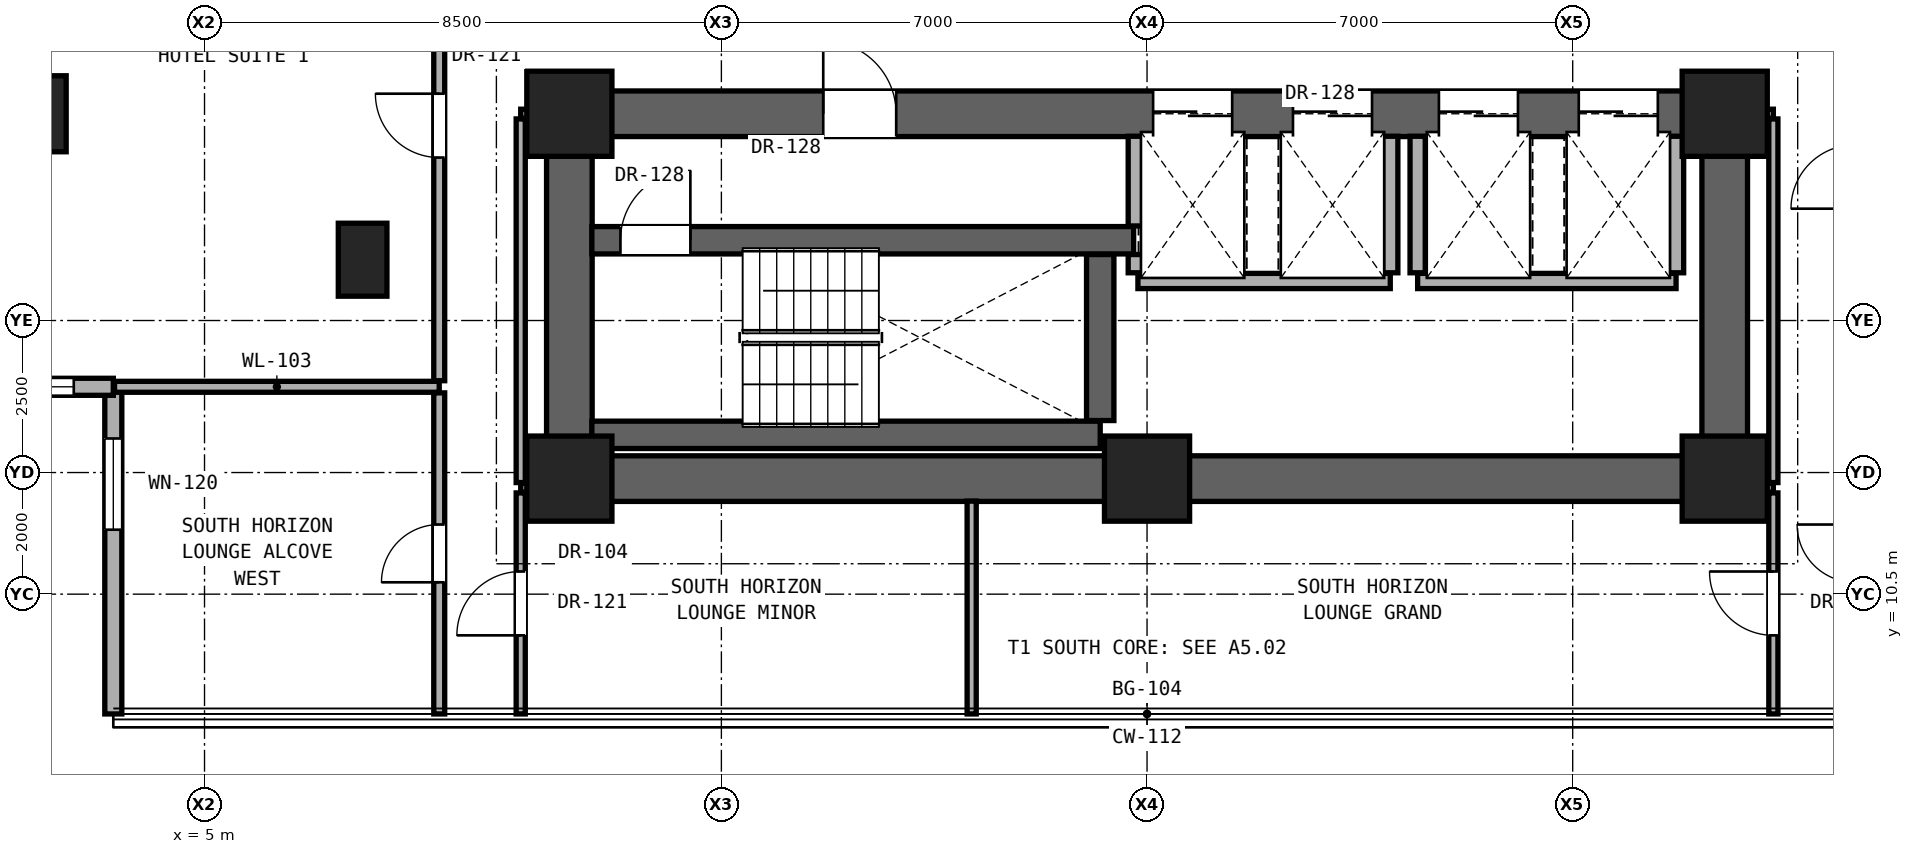
"""IFC4 building model, lengths in metres.
Left out: names, types, materials, properties, quantities, classifications, styles, units other than length and angle.
Written with IfcOpenShell. Run it as: python <this file> out.ifc"""

import sys

from ifc_helpers import new_model, si_unit, direction, frame, frame_2d, origin, origin_2d, place, context, subcontext, project, spatial, rectangle, hollow_rectangle, extrude, element, fill, save


model = new_model("IFC4")
c1 = context("Model", 3, precision=1e-05, world=origin(), true_north=direction((0.0, 1.0)))
c2 = subcontext(c1, "Body", "Model", "MODEL_VIEW")
j1 = project(units=[si_unit("LENGTHUNIT", "METRE"), si_unit("PLANEANGLEUNIT", "RADIAN")], contexts=[c1])
p1 = place(None, origin())
s1 = spatial("IfcSite", under=j1, at=p1, CompositionType="ELEMENT")
p2 = place(p1, origin())
s2 = spatial("IfcBuilding", under=s1, at=p2, CompositionType="ELEMENT")
p3 = place(p2, frame((0.0, 0.0, 38.9)))
s3 = spatial("IfcBuildingStorey", under=s2, at=p3, CompositionType="ELEMENT", Elevation=38.9)
for number, where, z_axis, x_axis in (
    (1, (11.0, 12.4, 0.0), (0.0, 0.0, 1.0), (1.0, 0.0, 0.0)),
    (2, (20.5, 12.4, 0.0), (0.0, 0.0, 1.0), (1.0, 0.0, 0.0)),
    (3, (30.0, 12.4, 0.0), (0.0, 0.0, 1.0), (1.0, 0.0, 0.0)),
    (4, (11.0, 18.4, 0.0), (0.0, 0.0, 1.0), (1.0, 0.0, 0.0)),
    (5, (30.0, 18.4, 0.0), (0.0, 0.0, 1.0), (1.0, 0.0, 0.0)),
):
    element("IfcColumn", number, at=place(p3, frame(where, z_axis=z_axis, x_axis=x_axis)), inside=s3, PredefinedType="COLUMN", context=c2, shape_type="SweptSolid", body=[
        extrude(rectangle(XDim=1.4, YDim=1.4, at=origin_2d()), origin(), (0.0, 0.0, 1.0), 3.3),
    ])
p4 = place(p3, frame((2.1, 18.4, 0.0), z_axis=(0.0, 0.0, 1.0), x_axis=(1.0, 0.0, 0.0)))
e6 = element("IfcColumn", 6, at=p4, inside=s3, PredefinedType="COLUMN", context=c2, shape_type="SweptSolid", body=[
    extrude(hollow_rectangle(XDim=1.25, YDim=1.25, WallThickness=0.07, at=origin_2d()), origin(), (0.0, 0.0, 1.0), 3.3),
])
p5 = place(p3, frame((7.6, 16.0, 0.0), z_axis=(0.0, 0.0, 1.0), x_axis=(1.0, 0.0, 0.0)))
e7 = element("IfcColumn", 7, at=p5, inside=s3, PredefinedType="PILASTER", context=c2, shape_type="SweptSolid", body=[
    extrude(rectangle(XDim=0.8, YDim=1.2, at=origin_2d()), origin(), (0.0, 0.0, 1.0), 3.3),
])
p6 = place(p3, frame((11.0, 12.4, 0.0), z_axis=(0.0, 0.0, 1.0), x_axis=(1.0, 0.0, 0.0)))
e8 = element("IfcWall", 8, at=p6, inside=s3, PredefinedType="SHEAR", context=c2, shape_type="SweptSolid", body=[
    extrude(rectangle(XDim=19.0, YDim=0.75, at=frame_2d((9.5, 0.0))), origin(), (0.0, 0.0, 1.0), 3.06),
])
for number, where, z_axis, x_axis in (
    (9, (11.0, 12.4, 0.0), (0.0, 0.0, 1.0), (0.0, 1.0, 0.0)),
    (10, (30.0, 12.4, 0.0), (0.0, 0.0, 1.0), (0.0, 1.0, 0.0)),
):
    element("IfcWall", number, at=place(p3, frame(where, z_axis=z_axis, x_axis=x_axis)), inside=s3, PredefinedType="SHEAR", context=c2, shape_type="SweptSolid", body=[
        extrude(rectangle(XDim=6.0, YDim=0.75, at=frame_2d((3.0, 0.0))), origin(), (0.0, 0.0, 1.0), 3.06),
    ])
p7 = place(p3, frame((11.0, 18.4, 0.0), z_axis=(0.0, 0.0, 1.0), x_axis=(1.0, 0.0, 0.0)))
e11 = element("IfcWall", 11, at=p7, inside=s3, PredefinedType="SHEAR", context=c2, shape_type="SweptSolid", body=[
    extrude(rectangle(XDim=19.0, YDim=0.75, at=frame_2d((9.5, 0.0))), origin(), (0.0, 0.0, 1.0), 3.06),
])
p8 = place(p7, frame((4.175, 0.0, 0.0)))
e12 = element("IfcOpeningElement", 12, at=p8, cuts=e11, PredefinedType="OPENING", context=c2, shape_type="SweptSolid", body=[
    extrude(rectangle(XDim=1.2, YDim=2.25, at=frame_2d((0.6, 1.125))), frame((0.0, 0.385, 0.0), z_axis=(0.0, -1.0, 0.0), x_axis=(1.0, 0.0, 0.0)), (0.0, 0.0, 1.0), 0.77),
])
p9 = place(p7, frame((9.6, 0.0, 0.0)))
e13 = element("IfcOpeningElement", 13, at=p9, cuts=e11, PredefinedType="OPENING", context=c2, shape_type="SweptSolid", body=[
    extrude(rectangle(XDim=1.3, YDim=2.3, at=frame_2d((0.65, 1.15))), frame((0.0, 0.385, 0.0), z_axis=(0.0, -1.0, 0.0), x_axis=(1.0, 0.0, 0.0)), (0.0, 0.0, 1.0), 0.77),
])
p10 = place(p7, frame((11.9, 0.0, 0.0)))
e14 = element("IfcOpeningElement", 14, at=p10, cuts=e11, PredefinedType="OPENING", context=c2, shape_type="SweptSolid", body=[
    extrude(rectangle(XDim=1.3, YDim=2.3, at=frame_2d((0.65, 1.15))), frame((0.0, 0.385, 0.0), z_axis=(0.0, -1.0, 0.0), x_axis=(1.0, 0.0, 0.0)), (0.0, 0.0, 1.0), 0.77),
])
p11 = place(p7, frame((14.3, 0.0, 0.0)))
e15 = element("IfcOpeningElement", 15, at=p11, cuts=e11, PredefinedType="OPENING", context=c2, shape_type="SweptSolid", body=[
    extrude(rectangle(XDim=1.3, YDim=2.3, at=frame_2d((0.65, 1.15))), frame((0.0, 0.385, 0.0), z_axis=(0.0, -1.0, 0.0), x_axis=(1.0, 0.0, 0.0)), (0.0, 0.0, 1.0), 0.77),
])
p12 = place(p7, frame((16.6, 0.0, 0.0)))
e16 = element("IfcOpeningElement", 16, at=p12, cuts=e11, PredefinedType="OPENING", context=c2, shape_type="SweptSolid", body=[
    extrude(rectangle(XDim=1.3, YDim=2.3, at=frame_2d((0.65, 1.15))), frame((0.0, 0.385, 0.0), z_axis=(0.0, -1.0, 0.0), x_axis=(1.0, 0.0, 0.0)), (0.0, 0.0, 1.0), 0.77),
])
p13 = place(p3, frame((3.5, 13.91, 0.0), z_axis=(0.0, 0.0, 1.0), x_axis=(0.0, -1.0, 0.0)))
e17 = element("IfcWall", 17, at=p13, inside=s3, PredefinedType="SOLIDWALL", context=c2, shape_type="SweptSolid", body=[
    extrude(rectangle(XDim=5.38, YDim=0.28, at=frame_2d((2.69, 0.0))), origin(), (0.0, 0.0, 1.0), 3.04),
])
p14 = place(p13, frame((0.85, 0.0, 0.79)))
e18 = element("IfcOpeningElement", 18, at=p14, cuts=e17, PredefinedType="OPENING", context=c2, shape_type="SweptSolid", body=[
    extrude(rectangle(XDim=1.5, YDim=2.1, at=frame_2d((0.75, 1.05))), frame((0.0, 0.15, 0.0), z_axis=(0.0, -1.0, 0.0), x_axis=(1.0, 0.0, 0.0)), (0.0, 0.0, 1.0), 0.3),
])
p15 = place(p3, frame((-1.88, 13.91, 0.0), z_axis=(0.0, 0.0, 1.0), x_axis=(1.0, 0.0, 0.0)))
e19 = element("IfcWall", 19, at=p15, inside=s3, PredefinedType="SOLIDWALL", context=c2, shape_type="SweptSolid", body=[
    extrude(rectangle(XDim=5.38, YDim=0.28, at=frame_2d((2.69, 0.0))), origin(), (0.0, 0.0, 1.0), 3.04),
])
p16 = place(p15, frame((3.63, 0.0, 0.85)))
e20 = element("IfcOpeningElement", 20, at=p16, cuts=e19, PredefinedType="OPENING", context=c2, shape_type="SweptSolid", body=[
    extrude(rectangle(XDim=1.1, YDim=2.0, at=frame_2d((0.55, 1.0))), frame((0.0, 0.15, 0.0), z_axis=(0.0, -1.0, 0.0), x_axis=(1.0, 0.0, 0.0)), (0.0, 0.0, 1.0), 0.3),
])
for number, where, z_axis, x_axis in (
    (21, (10.2, 12.25, 0.0), (0.0, 0.0, 1.0), (1.0, 0.0, 0.0)),
    (22, (30.37, 12.25, 0.0), (0.0, 0.0, 1.0), (1.0, 0.0, 0.0)),
):
    element("IfcWall", number, at=place(p3, frame(where, z_axis=z_axis, x_axis=x_axis)), inside=s3, PredefinedType="PARTITIONING", context=c2, shape_type="SweptSolid", body=[
        extrude(rectangle(XDim=0.43, YDim=0.15, at=frame_2d((0.215, 0.0))), origin(), (0.0, 0.0, 1.0), 3.06),
    ])
p17 = place(p3, frame((11.37, 13.12, 0.0), z_axis=(0.0, 0.0, 1.0), x_axis=(1.0, 0.0, 0.0)))
e23 = element("IfcWall", 23, at=p17, inside=s3, PredefinedType="SHEAR", context=c2, shape_type="SweptSolid", body=[
    extrude(rectangle(XDim=8.36, YDim=0.45, at=frame_2d((4.18, 0.0))), origin(), (0.0, 0.0, 1.0), 3.06),
])
p18 = place(p3, frame((3.52, 13.91, 0.0), z_axis=(0.0, 0.0, 1.0), x_axis=(1.0, 0.0, 0.0)))
e24 = element("IfcWall", 24, at=p18, inside=s3, PredefinedType="PARTITIONING", context=c2, shape_type="SweptSolid", body=[
    extrude(rectangle(XDim=5.34, YDim=0.18, at=frame_2d((2.67, 0.0))), origin(), (0.0, 0.0, 1.0), 3.06),
])
p19 = place(p3, frame((20.35, 15.65, 0.0), z_axis=(0.0, 0.0, 1.0), x_axis=(1.0, 0.0, 0.0)))
e25 = element("IfcWall", 25, at=p19, inside=s3, PredefinedType="SOLIDWALL", context=c2, shape_type="SweptSolid", body=[
    extrude(rectangle(XDim=4.15, YDim=0.25, at=frame_2d((2.075, 0.0))), origin(), (0.0, 0.0, 1.0), 3.06),
])
p20 = place(p3, frame((24.95, 15.65, 0.0), z_axis=(0.0, 0.0, 1.0), x_axis=(1.0, 0.0, 0.0)))
e26 = element("IfcWall", 26, at=p20, inside=s3, PredefinedType="SOLIDWALL", context=c2, shape_type="SweptSolid", body=[
    extrude(rectangle(XDim=4.25, YDim=0.25, at=frame_2d((2.125, 0.0))), origin(), (0.0, 0.0, 1.0), 3.06),
])
p21 = place(p3, frame((11.37, 16.32, 0.0), z_axis=(0.0, 0.0, 1.0), x_axis=(1.0, 0.0, 0.0)))
e27 = element("IfcWall", 27, at=p21, inside=s3, PredefinedType="SHEAR", context=c2, shape_type="SweptSolid", body=[
    extrude(rectangle(XDim=8.91, YDim=0.45, at=frame_2d((4.455, 0.0))), origin(), (0.0, 0.0, 1.0), 3.06),
])
p22 = place(p21, frame((0.47, 0.0, 0.0)))
e28 = element("IfcOpeningElement", 28, at=p22, cuts=e27, PredefinedType="OPENING", context=c2, shape_type="SweptSolid", body=[
    extrude(rectangle(XDim=1.15, YDim=2.2, at=frame_2d((0.575, 1.1))), frame((0.0, 0.235, 0.0), z_axis=(0.0, -1.0, 0.0), x_axis=(1.0, 0.0, 0.0)), (0.0, 0.0, 1.0), 0.47),
])
for number, where, z_axis, x_axis in (
    (29, (10.2, 18.4, 0.0), (0.0, 0.0, 1.0), (1.0, 0.0, 0.0)),
    (30, (30.37, 18.4, 0.0), (0.0, 0.0, 1.0), (1.0, 0.0, 0.0)),
):
    element("IfcWall", number, at=place(p3, frame(where, z_axis=z_axis, x_axis=x_axis)), inside=s3, PredefinedType="PARTITIONING", context=c2, shape_type="SweptSolid", body=[
        extrude(rectangle(XDim=0.43, YDim=0.15, at=frame_2d((0.215, 0.0))), origin(), (0.0, 0.0, 1.0), 2.436),
    ])
p23 = place(p3, frame((8.86, 8.53, 0.0), z_axis=(0.0, 0.0, 1.0), x_axis=(0.0, 1.0, 0.0)))
e31 = element("IfcWall", 31, at=p23, inside=s3, PredefinedType="PARTITIONING", context=c2, shape_type="SweptSolid", body=[
    extrude(rectangle(XDim=5.28, YDim=0.18, at=frame_2d((2.64, 0.0))), origin(), (0.0, 0.0, 1.0), 3.06),
])
p24 = place(p23, frame((2.165, 0.0, 0.0)))
e32 = element("IfcOpeningElement", 32, at=p24, cuts=e31, PredefinedType="OPENING", context=c2, shape_type="SweptSolid", body=[
    extrude(rectangle(XDim=0.95, YDim=2.15, at=frame_2d((0.475, 1.075))), frame((0.0, 0.1, 0.0), z_axis=(0.0, -1.0, 0.0), x_axis=(1.0, 0.0, 0.0)), (0.0, 0.0, 1.0), 0.2),
])
p25 = place(p3, frame((8.86, 14.01, 0.0), z_axis=(0.0, 0.0, 1.0), x_axis=(0.0, 1.0, 0.0)))
e33 = element("IfcWall", 33, at=p25, inside=s3, PredefinedType="PARTITIONING", context=c2, shape_type="SweptSolid", body=[
    extrude(rectangle(XDim=8.39, YDim=0.18, at=frame_2d((4.195, 0.0))), origin(), (0.0, 0.0, 1.0), 2.436),
])
p26 = place(p25, frame((3.67, 0.0, 0.0)))
e34 = element("IfcOpeningElement", 34, at=p26, cuts=e33, PredefinedType="OPENING", context=c2, shape_type="SweptSolid", body=[
    extrude(rectangle(XDim=1.05, YDim=2.2, at=frame_2d((0.525, 1.1))), frame((0.0, 0.1, 0.0), z_axis=(0.0, -1.0, 0.0), x_axis=(1.0, 0.0, 0.0)), (0.0, 0.0, 1.0), 0.2),
])
p27 = place(p3, frame((10.2, 8.53, 0.0), z_axis=(0.0, 0.0, 1.0), x_axis=(0.0, 1.0, 0.0)))
e35 = element("IfcWall", 35, at=p27, inside=s3, PredefinedType="PARTITIONING", context=c2, shape_type="SweptSolid", body=[
    extrude(rectangle(XDim=3.635, YDim=0.15, at=frame_2d((1.817, 0.0))), origin(), (0.0, 0.0, 1.0), 3.06),
])
p28 = place(p27, frame((1.292, 0.0, 0.0)))
e36 = element("IfcOpeningElement", 36, at=p28, cuts=e35, PredefinedType="OPENING", context=c2, shape_type="SweptSolid", body=[
    extrude(rectangle(XDim=1.05, YDim=2.2, at=frame_2d((0.525, 1.1))), frame((0.0, 0.085, 0.0), z_axis=(0.0, -1.0, 0.0), x_axis=(1.0, 0.0, 0.0)), (0.0, 0.0, 1.0), 0.17),
])
p29 = place(p3, frame((10.2, 12.335, 0.0), z_axis=(0.0, 0.0, 1.0), x_axis=(0.0, 1.0, 0.0)))
e37 = element("IfcWall", 37, at=p29, inside=s3, PredefinedType="PARTITIONING", context=c2, shape_type="SweptSolid", body=[
    extrude(rectangle(XDim=5.98, YDim=0.15, at=frame_2d((2.99, 0.0))), origin(), (0.0, 0.0, 1.0), 2.436),
])
p30 = place(p3, frame((17.616, 8.53, 0.0), z_axis=(0.0, 0.0, 1.0), x_axis=(0.0, 1.0, 0.0)))
e38 = element("IfcWall", 38, at=p30, inside=s3, PredefinedType="PARTITIONING", context=c2, shape_type="SweptSolid", body=[
    extrude(rectangle(XDim=3.5, YDim=0.15, at=frame_2d((1.75, 0.0))), origin(), (0.0, 0.0, 1.0), 3.06),
])
p31 = place(p3, frame((19.73, 13.355, 0.0), z_axis=(0.0, 0.0, 1.0), x_axis=(0.0, 1.0, 0.0)))
e39 = element("IfcWall", 39, at=p31, inside=s3, PredefinedType="SHEAR", context=c2, shape_type="SweptSolid", body=[
    extrude(rectangle(XDim=2.73, YDim=0.45, at=frame_2d((1.365, 0.0))), origin(), (0.0, 0.0, 1.0), 3.06),
])
p32 = place(p3, frame((20.315, 15.785, 0.0), z_axis=(0.0, 0.0, 1.0), x_axis=(0.0, 1.0, 0.0)))
e40 = element("IfcWall", 40, at=p32, inside=s3, PredefinedType="SOLIDWALL", context=c2, shape_type="SweptSolid", body=[
    extrude(rectangle(XDim=0.3, YDim=0.25, at=frame_2d((0.15, 0.0))), origin(), (0.0, 0.0, 1.0), 3.06),
])
p33 = place(p3, frame((20.315, 16.555, 0.0), z_axis=(0.0, 0.0, 1.0), x_axis=(0.0, 1.0, 0.0)))
e41 = element("IfcWall", 41, at=p33, inside=s3, PredefinedType="SOLIDWALL", context=c2, shape_type="SweptSolid", body=[
    extrude(rectangle(XDim=1.475, YDim=0.25, at=frame_2d((0.738, 0.0))), origin(), (0.0, 0.0, 1.0), 3.06),
])
for number, where, z_axis, x_axis in (
    (42, (24.5, 15.785, 0.0), (0.0, 0.0, 1.0), (0.0, 1.0, 0.0)),
    (43, (24.95, 15.785, 0.0), (0.0, 0.0, 1.0), (0.0, 1.0, 0.0)),
    (44, (29.2, 15.785, 0.0), (0.0, 0.0, 1.0), (0.0, 1.0, 0.0)),
):
    element("IfcWall", number, at=place(p3, frame(where, z_axis=z_axis, x_axis=x_axis)), inside=s3, PredefinedType="SOLIDWALL", context=c2, shape_type="SweptSolid", body=[
        extrude(rectangle(XDim=2.245, YDim=0.25, at=frame_2d((1.123, 0.0))), origin(), (0.0, 0.0, 1.0), 3.06),
    ])
p34 = place(p3, frame((30.8, 8.53, 0.0), z_axis=(0.0, 0.0, 1.0), x_axis=(0.0, 1.0, 0.0)))
e45 = element("IfcWall", 45, at=p34, inside=s3, PredefinedType="PARTITIONING", context=c2, shape_type="SweptSolid", body=[
    extrude(rectangle(XDim=3.635, YDim=0.15, at=frame_2d((1.817, 0.0))), origin(), (0.0, 0.0, 1.0), 3.06),
])
p35 = place(p34, frame((1.292, 0.0, 0.0)))
e46 = element("IfcOpeningElement", 46, at=p35, cuts=e45, PredefinedType="OPENING", context=c2, shape_type="SweptSolid", body=[
    extrude(rectangle(XDim=1.05, YDim=2.2, at=frame_2d((0.525, 1.1))), frame((0.0, 0.085, 0.0), z_axis=(0.0, -1.0, 0.0), x_axis=(1.0, 0.0, 0.0)), (0.0, 0.0, 1.0), 0.17),
])
p36 = place(p3, frame((30.8, 12.335, 0.0), z_axis=(0.0, 0.0, 1.0), x_axis=(0.0, 1.0, 0.0)))
e47 = element("IfcWall", 47, at=p36, inside=s3, PredefinedType="PARTITIONING", context=c2, shape_type="SweptSolid", body=[
    extrude(rectangle(XDim=5.98, YDim=0.15, at=frame_2d((2.99, 0.0))), origin(), (0.0, 0.0, 1.0), 2.436),
])
p37 = place(p14, origin())
e48 = element("IfcWindow", 48, at=p37, inside=s3, PartitioningType="SINGLE_PANEL", PredefinedType="WINDOW", context=c2, shape_type="SweptSolid", body=[
    extrude(rectangle(XDim=1.5, YDim=2.1, at=frame_2d((0.75, 1.05))), frame((0.0, 0.03, 0.0), z_axis=(0.0, -1.0, 0.0), x_axis=(1.0, 0.0, 0.0)), (0.0, 0.0, 1.0), 0.06),
])
fill(e18, e48)
p38 = place(p16, origin())
e49 = element("IfcWindow", 49, at=p38, inside=s3, PartitioningType="SINGLE_PANEL", PredefinedType="WINDOW", context=c2, shape_type="SweptSolid", body=[
    extrude(rectangle(XDim=1.1, YDim=2.0, at=frame_2d((0.55, 1.0))), frame((0.0, 0.03, 0.0), z_axis=(0.0, -1.0, 0.0), x_axis=(1.0, 0.0, 0.0)), (0.0, 0.0, 1.0), 0.06),
])
fill(e20, e49)
p39 = place(p8, origin())
e50 = element("IfcDoor", 50, at=p39, inside=s3, OperationType="SINGLE_SWING_LEFT", PredefinedType="DOOR", context=c2, shape_type="SweptSolid", body=[
    extrude(rectangle(XDim=1.2, YDim=2.25, at=frame_2d((0.6, 1.125))), frame((0.0, 0.025, 0.0), z_axis=(0.0, -1.0, 0.0), x_axis=(1.0, 0.0, 0.0)), (0.0, 0.0, 1.0), 0.05),
])
fill(e12, e50)
p40 = place(p22, origin())
e51 = element("IfcDoor", 51, at=p40, inside=s3, OperationType="SINGLE_SWING_RIGHT", PredefinedType="DOOR", context=c2, shape_type="SweptSolid", body=[
    extrude(rectangle(XDim=1.15, YDim=2.2, at=frame_2d((0.575, 1.1))), frame((0.0, 0.025, 0.0), z_axis=(0.0, -1.0, 0.0), x_axis=(1.0, 0.0, 0.0)), (0.0, 0.0, 1.0), 0.05),
])
fill(e28, e51)
p41 = place(p26, origin())
e52 = element("IfcDoor", 52, at=p41, inside=s3, OperationType="SINGLE_SWING_RIGHT", PredefinedType="DOOR", context=c2, shape_type="SweptSolid", body=[
    extrude(rectangle(XDim=1.05, YDim=2.2, at=frame_2d((0.525, 1.1))), frame((0.0, 0.025, 0.0), z_axis=(0.0, -1.0, 0.0), x_axis=(1.0, 0.0, 0.0)), (0.0, 0.0, 1.0), 0.05),
])
fill(e34, e52)
p42 = place(p28, origin())
e53 = element("IfcDoor", 53, at=p42, inside=s3, OperationType="SINGLE_SWING_LEFT", PredefinedType="DOOR", context=c2, shape_type="SweptSolid", body=[
    extrude(rectangle(XDim=1.05, YDim=2.2, at=frame_2d((0.525, 1.1))), frame((0.0, 0.025, 0.0), z_axis=(0.0, -1.0, 0.0), x_axis=(1.0, 0.0, 0.0)), (0.0, 0.0, 1.0), 0.05),
])
fill(e36, e53)
p43 = place(p35, origin())
e54 = element("IfcDoor", 54, at=p43, inside=s3, OperationType="SINGLE_SWING_RIGHT", PredefinedType="DOOR", context=c2, shape_type="SweptSolid", body=[
    extrude(rectangle(XDim=1.05, YDim=2.2, at=frame_2d((0.525, 1.1))), frame((0.0, 0.025, 0.0), z_axis=(0.0, -1.0, 0.0), x_axis=(1.0, 0.0, 0.0)), (0.0, 0.0, 1.0), 0.05),
])
fill(e46, e54)
p44 = place(p24, origin())
e55 = element("IfcDoor", 55, at=p44, inside=s3, OperationType="SINGLE_SWING_LEFT", PredefinedType="DOOR", context=c2, shape_type="SweptSolid", body=[
    extrude(rectangle(XDim=0.95, YDim=2.15, at=frame_2d((0.475, 1.075))), frame((0.0, 0.025, 0.0), z_axis=(0.0, -1.0, 0.0), x_axis=(1.0, 0.0, 0.0)), (0.0, 0.0, 1.0), 0.05),
])
fill(e32, e55)
p45 = place(p9, origin())
e56 = element("IfcDoor", 56, at=p45, inside=s3, OperationType="DOUBLE_DOOR_SLIDING", PredefinedType="DOOR", context=c2, shape_type="SweptSolid", body=[
    extrude(rectangle(XDim=1.3, YDim=2.3, at=frame_2d((0.65, 1.15))), frame((0.0, 0.025, 0.0), z_axis=(0.0, -1.0, 0.0), x_axis=(1.0, 0.0, 0.0)), (0.0, 0.0, 1.0), 0.05),
])
fill(e13, e56)
p46 = place(p10, origin())
e57 = element("IfcDoor", 57, at=p46, inside=s3, OperationType="DOUBLE_DOOR_SLIDING", PredefinedType="DOOR", context=c2, shape_type="SweptSolid", body=[
    extrude(rectangle(XDim=1.3, YDim=2.3, at=frame_2d((0.65, 1.15))), frame((0.0, 0.025, 0.0), z_axis=(0.0, -1.0, 0.0), x_axis=(1.0, 0.0, 0.0)), (0.0, 0.0, 1.0), 0.05),
])
fill(e14, e57)
p47 = place(p11, origin())
e58 = element("IfcDoor", 58, at=p47, inside=s3, OperationType="DOUBLE_DOOR_SLIDING", PredefinedType="DOOR", context=c2, shape_type="SweptSolid", body=[
    extrude(rectangle(XDim=1.3, YDim=2.3, at=frame_2d((0.65, 1.15))), frame((0.0, 0.025, 0.0), z_axis=(0.0, -1.0, 0.0), x_axis=(1.0, 0.0, 0.0)), (0.0, 0.0, 1.0), 0.05),
])
fill(e15, e58)
p48 = place(p12, origin())
e59 = element("IfcDoor", 59, at=p48, inside=s3, OperationType="DOUBLE_DOOR_SLIDING", PredefinedType="DOOR", context=c2, shape_type="SweptSolid", body=[
    extrude(rectangle(XDim=1.3, YDim=2.3, at=frame_2d((0.65, 1.15))), frame((0.0, 0.025, 0.0), z_axis=(0.0, -1.0, 0.0), x_axis=(1.0, 0.0, 0.0)), (0.0, 0.0, 1.0), 0.05),
])
fill(e16, e59)
save(model, sys.argv[1])
